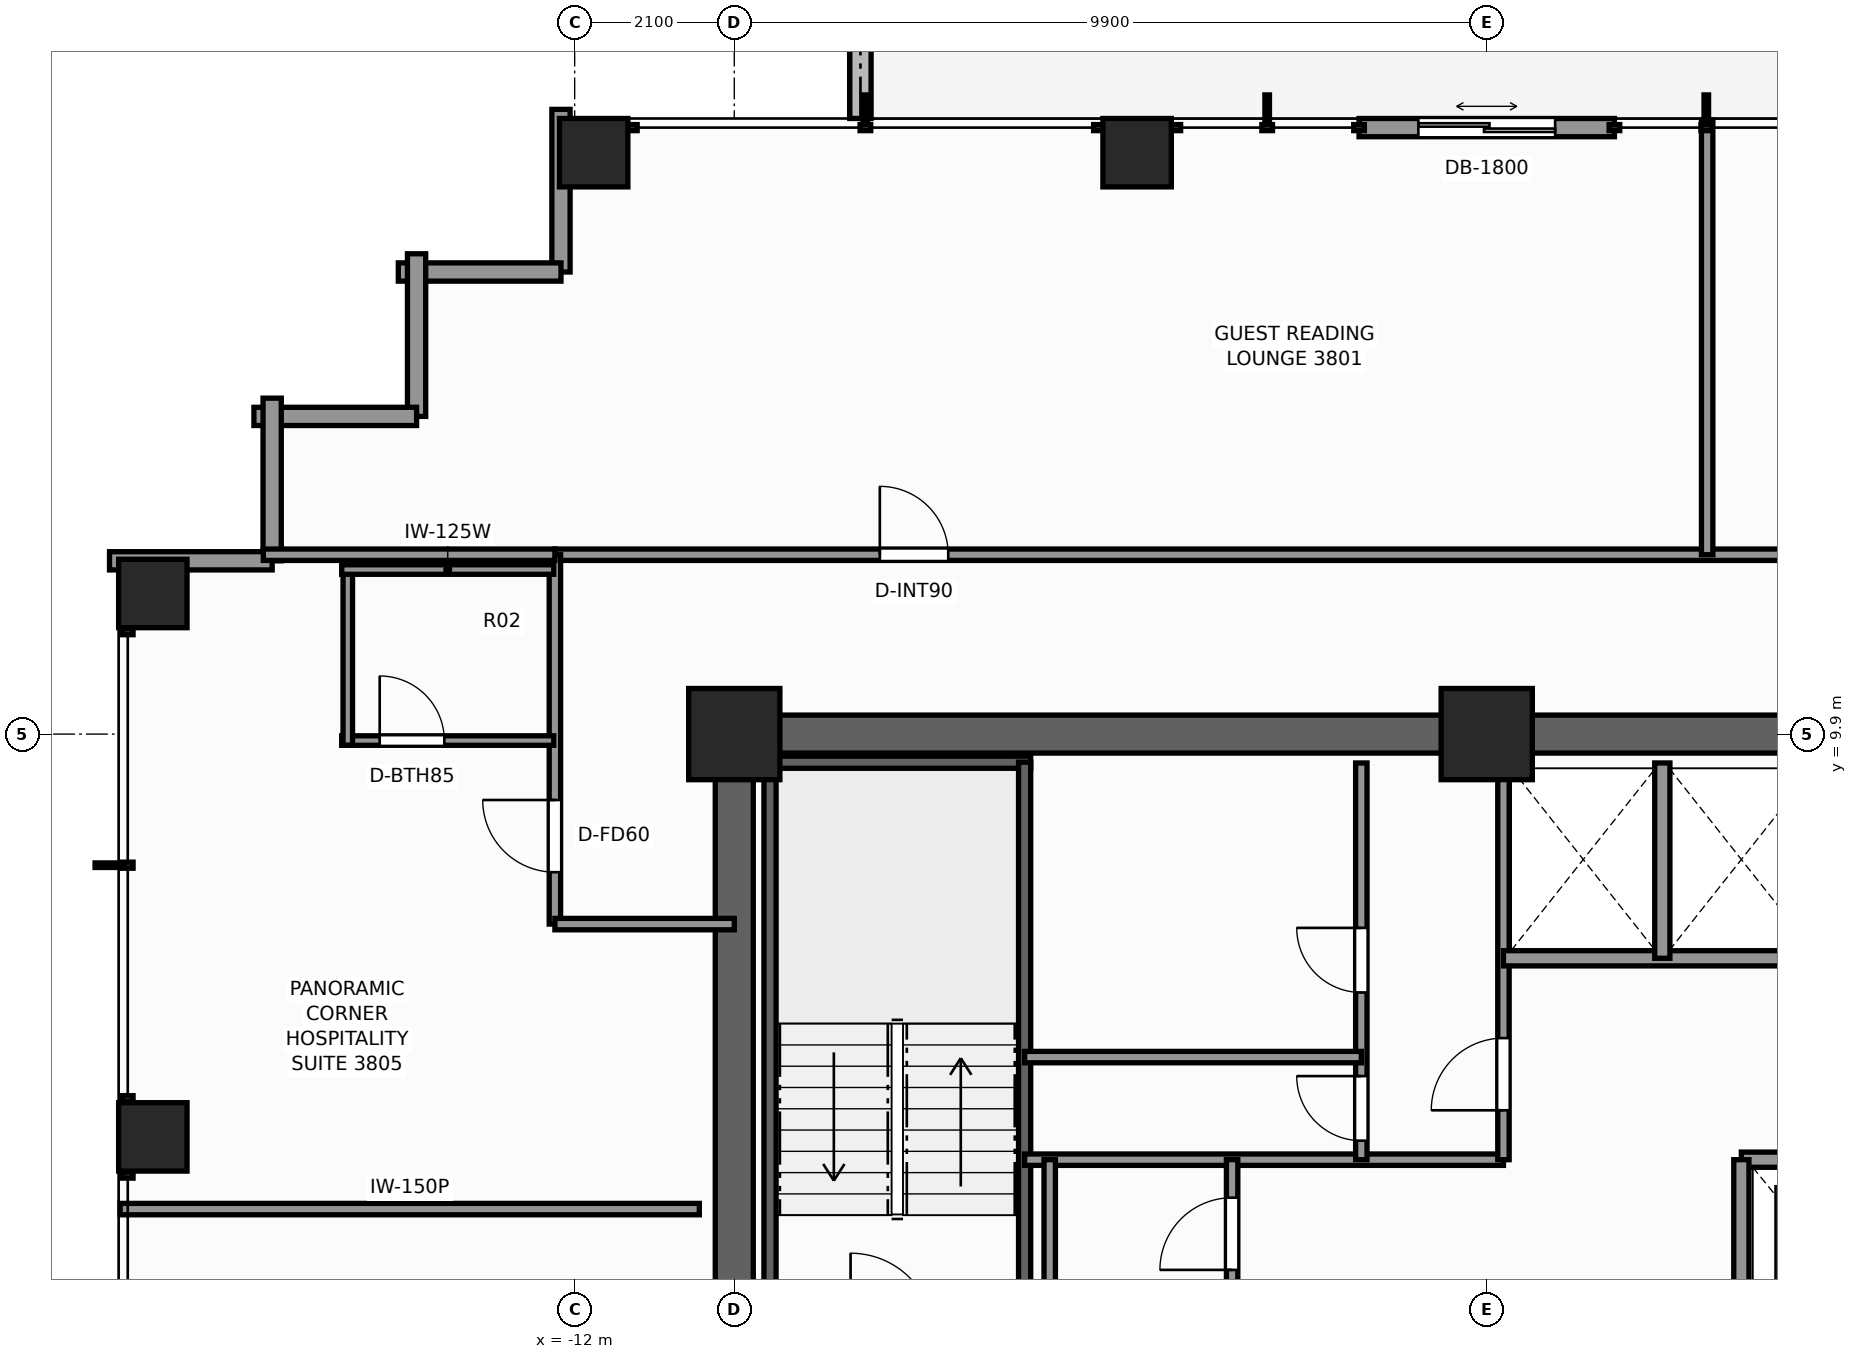
"""IFC4 building model, lengths in metres.
Left out: names, types, materials, properties, quantities, classifications, styles, units other than length and angle.
Written with IfcOpenShell. Run it as: python <this file> out.ifc"""

import sys

from ifc_helpers import new_model, si_unit, direction, frame, frame_2d, origin, origin_2d, place, context, subcontext, project, spatial, rectangle, extrude, element, fill, save


model = new_model("IFC4")
c1 = context("Model", 3, precision=1e-05, world=origin(), true_north=direction((0.0, 1.0)))
c2 = subcontext(c1, "Body", "Model", "MODEL_VIEW")
j1 = project(units=[si_unit("LENGTHUNIT", "METRE"), si_unit("PLANEANGLEUNIT", "RADIAN")], contexts=[c1])
p1 = place(None, origin())
s1 = spatial("IfcSite", under=j1, at=p1, CompositionType="ELEMENT")
p2 = place(p1, origin())
s2 = spatial("IfcBuilding", under=s1, at=p2, CompositionType="ELEMENT")
p3 = place(p2, frame((0.0, 0.0, 131.6)))
s3 = spatial("IfcBuildingStorey", under=s2, at=p3, CompositionType="ELEMENT", Elevation=131.6)
p4 = place(p3, frame((-10.15, 9.9, 0.0), z_axis=(0.0, 0.0, 1.0), x_axis=(1.0, 0.0, 0.0)))
e1 = element("IfcWall", 1, at=p4, inside=s3, PredefinedType="SHEAR", context=c2, shape_type="SweptSolid", body=[
    extrude(rectangle(XDim=14.57, YDim=0.5, at=frame_2d((7.285, 0.0))), origin(), (0.0, 0.0, 1.0), 3.3),
])
p5 = place(p3, frame((-9.9, -3.7, 0.0), z_axis=(0.0, 0.0, 1.0), x_axis=(0.0, 1.0, 0.0)))
e2 = element("IfcWall", 2, at=p5, inside=s3, PredefinedType="SHEAR", context=c2, shape_type="SweptSolid", body=[
    extrude(rectangle(XDim=13.35, YDim=0.5, at=frame_2d((6.675, 0.0))), origin(), (0.0, 0.0, 1.0), 3.3),
])
p6 = place(p5, frame((0.35, 0.0, 0.0)))
e3 = element("IfcOpeningElement", 3, at=p6, cuts=e2, PredefinedType="OPENING", context=c2, shape_type="SweptSolid", body=[
    extrude(rectangle(XDim=1.1, YDim=2.2, at=frame_2d((0.55, 1.1))), frame((0.0, 0.26, 0.0), z_axis=(0.0, -1.0, 0.0), x_axis=(1.0, 0.0, 0.0)), (0.0, 0.0, 1.0), 0.52),
])
for number, where, z_axis, x_axis in (
    (4, (-9.9, 9.9, 0.0), (0.0, 0.0, 1.0), (1.0, 0.0, 0.0)),
    (5, (0.0, 9.9, 0.0), (0.0, 0.0, 1.0), (1.0, 0.0, 0.0)),
):
    element("IfcColumn", number, at=place(p3, frame(where, z_axis=z_axis, x_axis=x_axis)), inside=s3, PredefinedType="COLUMN", context=c2, shape_type="SweptSolid", body=[
        extrude(rectangle(XDim=1.2, YDim=1.2, at=origin_2d()), origin(), (0.0, 0.0, 1.0), 3.3),
    ])
for number, where, z_axis, x_axis in (
    (6, (-11.75, 17.55, 0.0), (0.0, 0.0, 1.0), (1.0, 0.0, 0.0)),
    (7, (-4.6, 17.55, 0.0), (0.0, 0.0, 1.0), (1.0, 0.0, 0.0)),
    (8, (-17.55, 4.6, 0.0), (0.0, 0.0, 1.0), (1.0, 0.0, 0.0)),
    (9, (-17.55, 11.75, 0.0), (0.0, 0.0, 1.0), (1.0, 0.0, 0.0)),
):
    element("IfcColumn", number, at=place(p3, frame(where, z_axis=z_axis, x_axis=x_axis)), inside=s3, PredefinedType="COLUMN", context=c2, shape_type="SweptSolid", body=[
        extrude(rectangle(XDim=0.9, YDim=0.9, at=origin_2d()), origin(), (0.0, 0.0, 1.0), 3.3),
    ])
p7 = place(p3, frame((-8.24, 19.705, -0.02), z_axis=(0.0, 0.0, 1.0), x_axis=(0.0, -1.0, 0.0)))
e10 = element("IfcWall", 10, at=p7, inside=s3, PredefinedType="PARAPET", context=c2, shape_type="SweptSolid", body=[
    extrude(rectangle(XDim=1.705, YDim=0.28, at=frame_2d((0.853, 0.0))), origin(), (0.0, 0.0, 1.0), 0.42),
])
p8 = place(p3, frame((-1.68, 17.88, 0.0), z_axis=(0.0, 0.0, 1.0), x_axis=(1.0, 0.0, 0.0)))
e11 = element("IfcWall", 11, at=p8, inside=s3, PredefinedType="STANDARD", context=c2, shape_type="SweptSolid", body=[
    extrude(rectangle(XDim=3.36, YDim=0.24, at=frame_2d((1.68, 0.0))), origin(), (0.0, 0.0, 1.0), 3.1),
])
p9 = place(p8, frame((0.78, 0.0, 0.0)))
e12 = element("IfcOpeningElement", 12, at=p9, cuts=e11, PredefinedType="OPENING", context=c2, shape_type="SweptSolid", body=[
    extrude(rectangle(XDim=1.8, YDim=2.2, at=frame_2d((0.9, 1.1))), frame((0.0, 0.13, 0.0), z_axis=(0.0, -1.0, 0.0), x_axis=(1.0, 0.0, 0.0)), (0.0, 0.0, 1.0), 0.26),
])
for number, where, z_axis, x_axis in (
    (13, (-12.18, 15.98, 0.0), (0.0, 0.0, 1.0), (0.0, 1.0, 0.0)),
    (14, (-14.32, 15.98, 0.0), (0.0, 0.0, 1.0), (1.0, 0.0, 0.0)),
):
    element("IfcWall", number, at=place(p3, frame(where, z_axis=z_axis, x_axis=x_axis)), inside=s3, PredefinedType="STANDARD", context=c2, shape_type="SweptSolid", body=[
        extrude(rectangle(XDim=2.14, YDim=0.24, at=frame_2d((1.07, 0.0))), origin(), (0.0, 0.0, 1.0), 2.479),
    ])
for number, where, z_axis, x_axis in (
    (15, (-14.08, 14.08, 0.0), (0.0, 0.0, 1.0), (0.0, 1.0, 0.0)),
    (16, (-16.22, 14.08, 0.0), (0.0, 0.0, 1.0), (1.0, 0.0, 0.0)),
):
    element("IfcWall", number, at=place(p3, frame(where, z_axis=z_axis, x_axis=x_axis)), inside=s3, PredefinedType="STANDARD", context=c2, shape_type="SweptSolid", body=[
        extrude(rectangle(XDim=2.14, YDim=0.24, at=frame_2d((1.07, 0.0))), origin(), (0.0, 0.0, 1.0), 2.479),
    ])
for number, where, z_axis, x_axis in (
    (17, (-15.98, 12.18, 0.0), (0.0, 0.0, 1.0), (0.0, 1.0, 0.0)),
    (18, (-18.12, 12.18, 0.0), (0.0, 0.0, 1.0), (1.0, 0.0, 0.0)),
):
    element("IfcWall", number, at=place(p3, frame(where, z_axis=z_axis, x_axis=x_axis)), inside=s3, PredefinedType="STANDARD", context=c2, shape_type="SweptSolid", body=[
        extrude(rectangle(XDim=2.14, YDim=0.24, at=frame_2d((1.07, 0.0))), origin(), (0.0, 0.0, 1.0), 2.479),
    ])
p10 = place(p3, frame((-9.52, 9.53, 0.0), z_axis=(0.0, 0.0, 1.0), x_axis=(1.0, 0.0, 0.0)))
e19 = element("IfcWall", 19, at=p10, inside=s3, PredefinedType="SHEAR", context=c2, shape_type="SweptSolid", body=[
    extrude(rectangle(XDim=3.52, YDim=0.16, at=frame_2d((1.76, 0.0))), origin(), (0.0, 0.0, 1.0), 3.3),
])
for number, where, z_axis, x_axis in (
    (20, (-9.43, 1.97, 0.0), (0.0, 0.0, 1.0), (0.0, 1.0, 0.0)),
    (21, (-6.08, 1.97, 0.0), (0.0, 0.0, 1.0), (0.0, 1.0, 0.0)),
):
    element("IfcWall", number, at=place(p3, frame(where, z_axis=z_axis, x_axis=x_axis)), inside=s3, PredefinedType="SHEAR", context=c2, shape_type="SweptSolid", body=[
        extrude(rectangle(XDim=7.56, YDim=0.16, at=frame_2d((3.78, 0.0))), origin(), (0.0, 0.0, 1.0), 3.3),
    ])
p11 = place(p3, frame((3.35, 4.3, 0.0), z_axis=(0.0, 0.0, 1.0), x_axis=(1.0, 0.0, 0.0)))
e22 = element("IfcWall", 22, at=p11, inside=s3, PredefinedType="SOLIDWALL", context=c2, shape_type="SweptSolid", body=[
    extrude(rectangle(XDim=2.73, YDim=0.2, at=frame_2d((1.365, 0.0))), origin(), (0.0, 0.0, 1.0), 3.1),
])
p12 = place(p11, frame((0.75, 0.0, 0.0)))
e23 = element("IfcOpeningElement", 23, at=p12, cuts=e22, PredefinedType="OPENING", context=c2, shape_type="SweptSolid", body=[
    extrude(rectangle(XDim=1.2, YDim=2.25, at=frame_2d((0.6, 1.125))), frame((0.0, 0.11, 0.0), z_axis=(0.0, -1.0, 0.0), x_axis=(1.0, 0.0, 0.0)), (0.0, 0.0, 1.0), 0.22),
])
p13 = place(p3, frame((3.35, 1.1, 0.0), z_axis=(0.0, 0.0, 1.0), x_axis=(0.0, 1.0, 0.0)))
e24 = element("IfcWall", 24, at=p13, inside=s3, PredefinedType="SOLIDWALL", context=c2, shape_type="SweptSolid", body=[
    extrude(rectangle(XDim=3.2, YDim=0.2, at=frame_2d((1.6, 0.0))), origin(), (0.0, 0.0, 1.0), 2.735),
])
p14 = place(p3, frame((-6.08, 4.3, 0.0), z_axis=(0.0, 0.0, 1.0), x_axis=(1.0, 0.0, 0.0)))
e25 = element("IfcWall", 25, at=p14, inside=s3, PredefinedType="PARTITIONING", context=c2, shape_type="SweptSolid", body=[
    extrude(rectangle(XDim=6.3, YDim=0.15, at=frame_2d((3.15, 0.0))), origin(), (0.0, 0.0, 1.0), 3.1),
])
p15 = place(p3, frame((0.22, 4.3, 0.0), z_axis=(0.0, 0.0, 1.0), x_axis=(0.0, 1.0, 0.0)))
e26 = element("IfcWall", 26, at=p15, inside=s3, PredefinedType="PARTITIONING", context=c2, shape_type="SweptSolid", body=[
    extrude(rectangle(XDim=5.22, YDim=0.15, at=frame_2d((2.61, 0.0))), origin(), (0.0, 0.0, 1.0), 3.1),
])
p16 = place(p15, frame((0.65, 0.0, 0.0)))
e27 = element("IfcOpeningElement", 27, at=p16, cuts=e26, PredefinedType="OPENING", context=c2, shape_type="SweptSolid", body=[
    extrude(rectangle(XDim=0.95, YDim=2.06, at=frame_2d((0.475, 1.03))), frame((0.0, 0.085, 0.0), z_axis=(0.0, -1.0, 0.0), x_axis=(1.0, 0.0, 0.0)), (0.0, 0.0, 1.0), 0.17),
])
p17 = place(p3, frame((-1.65, 4.3, 0.0), z_axis=(0.0, 0.0, 1.0), x_axis=(0.0, 1.0, 0.0)))
e28 = element("IfcWall", 28, at=p17, inside=s3, PredefinedType="PARTITIONING", context=c2, shape_type="SweptSolid", body=[
    extrude(rectangle(XDim=5.22, YDim=0.15, at=frame_2d((2.61, 0.0))), origin(), (0.0, 0.0, 1.0), 3.1),
])
p18 = place(p17, frame((2.2, 0.0, 0.0)))
e29 = element("IfcOpeningElement", 29, at=p18, cuts=e28, PredefinedType="OPENING", context=c2, shape_type="SweptSolid", body=[
    extrude(rectangle(XDim=0.85, YDim=2.03, at=frame_2d((0.425, 1.015))), frame((0.0, 0.085, 0.0), z_axis=(0.0, -1.0, 0.0), x_axis=(1.0, 0.0, 0.0)), (0.0, 0.0, 1.0), 0.17),
])
p19 = place(p17, frame((0.25, 0.0, 0.0)))
e30 = element("IfcOpeningElement", 30, at=p19, cuts=e28, PredefinedType="OPENING", context=c2, shape_type="SweptSolid", body=[
    extrude(rectangle(XDim=0.85, YDim=2.03, at=frame_2d((0.425, 1.015))), frame((0.0, 0.085, 0.0), z_axis=(0.0, -1.0, 0.0), x_axis=(1.0, 0.0, 0.0)), (0.0, 0.0, 1.0), 0.17),
])
p20 = place(p3, frame((-6.08, 5.65, 0.0), z_axis=(0.0, 0.0, 1.0), x_axis=(1.0, 0.0, 0.0)))
e31 = element("IfcWall", 31, at=p20, inside=s3, PredefinedType="PARTITIONING", context=c2, shape_type="SweptSolid", body=[
    extrude(rectangle(XDim=4.43, YDim=0.15, at=frame_2d((2.215, 0.0))), origin(), (0.0, 0.0, 1.0), 3.1),
])
p21 = place(p3, frame((0.22, 6.95, 0.0), z_axis=(0.0, 0.0, 1.0), x_axis=(1.0, 0.0, 0.0)))
e32 = element("IfcWall", 32, at=p21, inside=s3, PredefinedType="SOLIDWALL", context=c2, shape_type="SweptSolid", body=[
    extrude(rectangle(XDim=4.18, YDim=0.2, at=frame_2d((2.09, 0.0))), origin(), (0.0, 0.0, 1.0), 3.1),
])
p22 = place(p3, frame((2.31, 6.95, 0.0), z_axis=(0.0, 0.0, 1.0), x_axis=(0.0, 1.0, 0.0)))
e33 = element("IfcWall", 33, at=p22, inside=s3, PredefinedType="SOLIDWALL", context=c2, shape_type="SweptSolid", body=[
    extrude(rectangle(XDim=2.57, YDim=0.2, at=frame_2d((1.285, 0.0))), origin(), (0.0, 0.0, 1.0), 3.1),
])
p23 = place(p3, frame((-3.35, 1.1, 0.0), z_axis=(0.0, 0.0, 1.0), x_axis=(0.0, 1.0, 0.0)))
e34 = element("IfcWall", 34, at=p23, inside=s3, PredefinedType="PARTITIONING", context=c2, shape_type="SweptSolid", body=[
    extrude(rectangle(XDim=3.2, YDim=0.15, at=frame_2d((1.6, 0.0))), origin(), (0.0, 0.0, 1.0), 2.735),
])
p24 = place(p23, frame((1.75, 0.0, 0.0)))
e35 = element("IfcOpeningElement", 35, at=p24, cuts=e34, PredefinedType="OPENING", context=c2, shape_type="SweptSolid", body=[
    extrude(rectangle(XDim=0.95, YDim=2.06, at=frame_2d((0.475, 1.03))), frame((0.0, 0.085, 0.0), z_axis=(0.0, -1.0, 0.0), x_axis=(1.0, 0.0, 0.0)), (0.0, 0.0, 1.0), 0.17),
])
p25 = place(p3, frame((-5.75, 1.97, 0.0), z_axis=(0.0, 0.0, 1.0), x_axis=(0.0, 1.0, 0.0)))
e36 = element("IfcWall", 36, at=p25, inside=s3, PredefinedType="PARTITIONING", context=c2, shape_type="SweptSolid", body=[
    extrude(rectangle(XDim=2.33, YDim=0.15, at=frame_2d((1.165, 0.0))), origin(), (0.0, 0.0, 1.0), 2.735),
])
p26 = place(p3, frame((-12.26, 12.26, 0.0), z_axis=(0.0, 0.0, 1.0), x_axis=(1.0, 0.0, 0.0)))
e37 = element("IfcWall", 37, at=p26, inside=s3, PredefinedType="PARTITIONING", context=c2, shape_type="SweptSolid", body=[
    extrude(rectangle(XDim=24.68, YDim=0.15, at=frame_2d((12.34, 0.0))), origin(), (0.0, 0.0, 1.0), 2.312),
])
p27 = place(p26, frame((4.275, 0.0, 0.0)))
e38 = element("IfcOpeningElement", 38, at=p27, cuts=e37, PredefinedType="OPENING", context=c2, shape_type="SweptSolid", body=[
    extrude(rectangle(XDim=0.9, YDim=2.06, at=frame_2d((0.45, 1.03))), frame((0.0, 0.085, 0.0), z_axis=(0.0, -1.0, 0.0), x_axis=(1.0, 0.0, 0.0)), (0.0, 0.0, 1.0), 0.17),
])
p28 = place(p26, frame((19.345, 0.0, 0.0)))
e39 = element("IfcOpeningElement", 39, at=p28, cuts=e37, PredefinedType="OPENING", context=c2, shape_type="SweptSolid", body=[
    extrude(rectangle(XDim=0.9, YDim=2.06, at=frame_2d((0.45, 1.03))), frame((0.0, 0.085, 0.0), z_axis=(0.0, -1.0, 0.0), x_axis=(1.0, 0.0, 0.0)), (0.0, 0.0, 1.0), 0.17),
])
p29 = place(p3, frame((-12.26, 7.4, 0.0), z_axis=(0.0, 0.0, 1.0), x_axis=(0.0, 1.0, 0.0)))
e40 = element("IfcWall", 40, at=p29, inside=s3, PredefinedType="PARTITIONING", context=c2, shape_type="SweptSolid", body=[
    extrude(rectangle(XDim=4.86, YDim=0.15, at=frame_2d((2.43, 0.0))), origin(), (0.0, 0.0, 1.0), 2.312),
])
p30 = place(p29, frame((0.683, 0.0, 0.0)))
e41 = element("IfcOpeningElement", 41, at=p30, cuts=e40, PredefinedType="OPENING", context=c2, shape_type="SweptSolid", body=[
    extrude(rectangle(XDim=0.95, YDim=2.06, at=frame_2d((0.475, 1.03))), frame((0.0, 0.085, 0.0), z_axis=(0.0, -1.0, 0.0), x_axis=(1.0, 0.0, 0.0)), (0.0, 0.0, 1.0), 0.17),
])
p31 = place(p3, frame((-12.26, 7.4, 0.0), z_axis=(0.0, 0.0, 1.0), x_axis=(1.0, 0.0, 0.0)))
e42 = element("IfcWall", 42, at=p31, inside=s3, PredefinedType="PARTITIONING", context=c2, shape_type="SweptSolid", body=[
    extrude(rectangle(XDim=2.36, YDim=0.15, at=frame_2d((1.18, 0.0))), origin(), (0.0, 0.0, 1.0), 3.1),
])
p32 = place(p3, frame((-16.096, 12.26, 0.0), z_axis=(0.0, 0.0, 1.0), x_axis=(1.0, 0.0, 0.0)))
e43 = element("IfcWall", 43, at=p32, inside=s3, PredefinedType="PARTITIONING", context=c2, shape_type="SweptSolid", body=[
    extrude(rectangle(XDim=3.836, YDim=0.15, at=frame_2d((1.918, 0.0))), origin(), (0.0, 0.0, 1.0), 3.1),
])
p33 = place(p3, frame((2.9, 12.26, 0.0), z_axis=(0.0, 0.0, 1.0), x_axis=(0.0, 1.0, 0.0)))
e44 = element("IfcWall", 44, at=p33, inside=s3, PredefinedType="PARTITIONING", context=c2, shape_type="SweptSolid", body=[
    extrude(rectangle(XDim=5.72, YDim=0.15, at=frame_2d((2.86, 0.0))), origin(), (0.0, 0.0, 1.0), 2.389),
])
p34 = place(p3, frame((-17.98, 3.65, 0.0), z_axis=(0.0, 0.0, 1.0), x_axis=(1.0, 0.0, 0.0)))
e45 = element("IfcWall", 45, at=p34, inside=s3, PredefinedType="PARTITIONING", context=c2, shape_type="SweptSolid", body=[
    extrude(rectangle(XDim=7.62, YDim=0.15, at=frame_2d((3.81, 0.0))), origin(), (0.0, 0.0, 1.0), 2.469),
])
p35 = place(p3, frame((-15.065, 9.815, 0.0), z_axis=(0.0, 0.0, 1.0), x_axis=(1.0, 0.0, 0.0)))
e46 = element("IfcWall", 46, at=p35, inside=s3, PredefinedType="PARTITIONING", context=c2, shape_type="SweptSolid", body=[
    extrude(rectangle(XDim=2.79, YDim=0.125, at=frame_2d((1.395, 0.0))), origin(), (0.0, 0.0, 1.0), 3.1),
])
p36 = place(p35, frame((0.5, 0.0, 0.0)))
e47 = element("IfcOpeningElement", 47, at=p36, cuts=e46, PredefinedType="OPENING", context=c2, shape_type="SweptSolid", body=[
    extrude(rectangle(XDim=0.85, YDim=2.03, at=frame_2d((0.425, 1.015))), frame((0.0, 0.073, 0.0), z_axis=(0.0, -1.0, 0.0), x_axis=(1.0, 0.0, 0.0)), (0.0, 0.0, 1.0), 0.145),
])
p37 = place(p3, frame((-14.985, 9.755, 0.0), z_axis=(0.0, 0.0, 1.0), x_axis=(0.0, 1.0, 0.0)))
e48 = element("IfcWall", 48, at=p37, inside=s3, PredefinedType="PARTITIONING", context=c2, shape_type="SweptSolid", body=[
    extrude(rectangle(XDim=2.37, YDim=0.125, at=frame_2d((1.185, 0.0))), origin(), (0.0, 0.0, 1.0), 2.312),
])
p38 = place(p3, frame((-15.065, 12.065, 0.0), z_axis=(0.0, 0.0, 1.0), x_axis=(1.0, 0.0, 0.0)))
e49 = element("IfcWall", 49, at=p38, inside=s3, PredefinedType="PARTITIONING", context=c2, shape_type="SweptSolid", body=[
    extrude(rectangle(XDim=2.79, YDim=0.125, at=frame_2d((1.395, 0.0))), origin(), (0.0, 0.0, 1.0), 3.1),
])
p39 = place(p9, origin())
e50 = element("IfcDoor", 50, at=p39, inside=s3, OperationType="DOUBLE_DOOR_SLIDING", PredefinedType="DOOR", context=c2, shape_type="SweptSolid", body=[
    extrude(rectangle(XDim=1.8, YDim=2.2, at=frame_2d((0.9, 1.1))), frame((0.0, 0.025, 0.0), z_axis=(0.0, -1.0, 0.0), x_axis=(1.0, 0.0, 0.0)), (0.0, 0.0, 1.0), 0.05),
])
fill(e12, e50)
p40 = place(p16, origin())
e51 = element("IfcDoor", 51, at=p40, inside=s3, OperationType="SINGLE_SWING_LEFT", PredefinedType="DOOR", context=c2, shape_type="SweptSolid", body=[
    extrude(rectangle(XDim=0.95, YDim=2.06, at=frame_2d((0.475, 1.03))), frame((0.0, 0.025, 0.0), z_axis=(0.0, -1.0, 0.0), x_axis=(1.0, 0.0, 0.0)), (0.0, 0.0, 1.0), 0.05),
])
fill(e27, e51)
p41 = place(p18, origin())
e52 = element("IfcDoor", 52, at=p41, inside=s3, OperationType="SINGLE_SWING_RIGHT", PredefinedType="DOOR", context=c2, shape_type="SweptSolid", body=[
    extrude(rectangle(XDim=0.85, YDim=2.03, at=frame_2d((0.425, 1.015))), frame((0.0, 0.025, 0.0), z_axis=(0.0, -1.0, 0.0), x_axis=(1.0, 0.0, 0.0)), (0.0, 0.0, 1.0), 0.05),
])
fill(e29, e52)
p42 = place(p19, origin())
e53 = element("IfcDoor", 53, at=p42, inside=s3, OperationType="SINGLE_SWING_RIGHT", PredefinedType="DOOR", context=c2, shape_type="SweptSolid", body=[
    extrude(rectangle(XDim=0.85, YDim=2.03, at=frame_2d((0.425, 1.015))), frame((0.0, 0.025, 0.0), z_axis=(0.0, -1.0, 0.0), x_axis=(1.0, 0.0, 0.0)), (0.0, 0.0, 1.0), 0.05),
])
fill(e30, e53)
p43 = place(p24, origin())
e54 = element("IfcDoor", 54, at=p43, inside=s3, OperationType="SINGLE_SWING_LEFT", PredefinedType="DOOR", context=c2, shape_type="SweptSolid", body=[
    extrude(rectangle(XDim=0.95, YDim=2.06, at=frame_2d((0.475, 1.03))), frame((0.0, 0.025, 0.0), z_axis=(0.0, -1.0, 0.0), x_axis=(1.0, 0.0, 0.0)), (0.0, 0.0, 1.0), 0.05),
])
fill(e35, e54)
p44 = place(p27, origin())
e55 = element("IfcDoor", 55, at=p44, inside=s3, OperationType="SINGLE_SWING_LEFT", PredefinedType="DOOR", context=c2, shape_type="SweptSolid", body=[
    extrude(rectangle(XDim=0.9, YDim=2.06, at=frame_2d((0.45, 1.03))), frame((0.0, 0.025, 0.0), z_axis=(0.0, -1.0, 0.0), x_axis=(1.0, 0.0, 0.0)), (0.0, 0.0, 1.0), 0.05),
])
fill(e38, e55)
p45 = place(p36, origin())
e56 = element("IfcDoor", 56, at=p45, inside=s3, OperationType="SINGLE_SWING_LEFT", PredefinedType="DOOR", context=c2, shape_type="SweptSolid", body=[
    extrude(rectangle(XDim=0.85, YDim=2.03, at=frame_2d((0.425, 1.015))), frame((0.0, 0.025, 0.0), z_axis=(0.0, -1.0, 0.0), x_axis=(1.0, 0.0, 0.0)), (0.0, 0.0, 1.0), 0.05),
])
fill(e47, e56)
p46 = place(p30, origin())
e57 = element("IfcDoor", 57, at=p46, inside=s3, OperationType="SINGLE_SWING_RIGHT", PredefinedType="DOOR", context=c2, shape_type="SweptSolid", body=[
    extrude(rectangle(XDim=0.95, YDim=2.06, at=frame_2d((0.475, 1.03))), frame((0.0, 0.025, 0.0), z_axis=(0.0, -1.0, 0.0), x_axis=(1.0, 0.0, 0.0)), (0.0, 0.0, 1.0), 0.05),
])
fill(e41, e57)
save(model, sys.argv[1])
